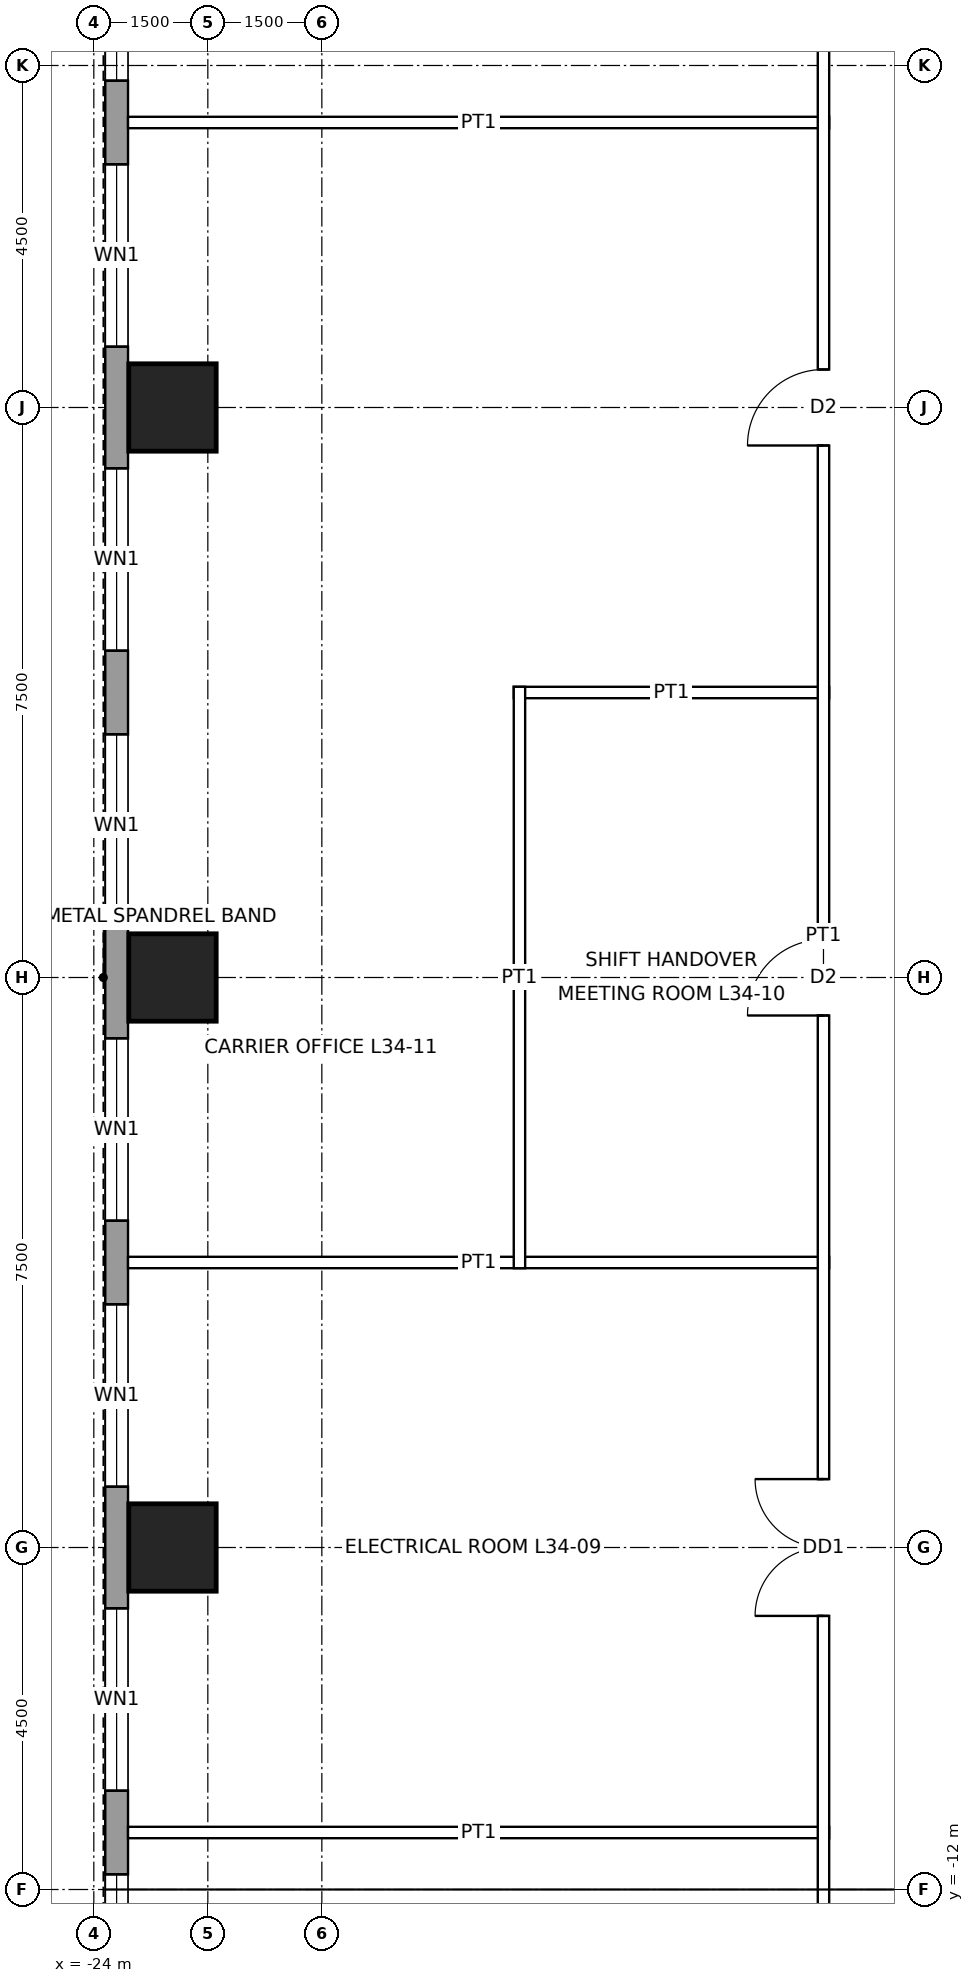
"""IFC4 building model, lengths in metres.
Left out: names, types, materials, properties, quantities, classifications, styles, units other than length and angle.
Written with IfcOpenShell. Run it as: python <this file> out.ifc"""

import sys

from ifc_helpers import new_model, si_unit, direction, frame, frame_2d, origin, origin_2d, place, context, subcontext, project, spatial, rectangle, hollow_rectangle, extrude, element, fill, save


model = new_model("IFC4")
c1 = context("Model", 3, precision=1e-05, world=origin(), true_north=direction((0.0, 1.0)))
c2 = subcontext(c1, "Body", "Model", "MODEL_VIEW")
j1 = project(units=[si_unit("LENGTHUNIT", "METRE"), si_unit("PLANEANGLEUNIT", "RADIAN")], contexts=[c1])
p1 = place(None, origin())
s1 = spatial("IfcSite", under=j1, at=p1, CompositionType="ELEMENT")
p2 = place(p1, origin())
s2 = spatial("IfcBuilding", under=s1, at=p2, CompositionType="ELEMENT")
p3 = place(p2, frame((0.0, 0.0, 167.4)))
s3 = spatial("IfcBuildingStorey", under=s2, at=p3, CompositionType="ELEMENT", Elevation=167.4)
for number, where, z_axis, x_axis in (
    (1, (-22.965, -7.5, 0.0), (0.0, 0.0, 1.0), (1.0, 0.0, 0.0)),
    (2, (-22.965, 0.0, 0.0), (0.0, 0.0, 1.0), (1.0, 0.0, 0.0)),
    (3, (-22.965, 7.5, 0.0), (0.0, 0.0, 1.0), (1.0, 0.0, 0.0)),
):
    element("IfcColumn", number, at=place(p3, frame(where, z_axis=z_axis, x_axis=x_axis)), inside=s3, PredefinedType="COLUMN", context=c2, shape_type="SweptSolid", body=[
        extrude(hollow_rectangle(XDim=1.15, YDim=1.15, WallThickness=0.075, at=origin_2d()), origin(), (0.0, 0.0, 1.0), 4.5),
    ])
p4 = place(p3, frame((-23.7, -16.2, 0.0), z_axis=(0.0, 0.0, 1.0), x_axis=(0.0, 1.0, 0.0)))
e4 = element("IfcWall", 4, at=p4, inside=s3, PredefinedType="SOLIDWALL", context=c2, shape_type="SweptSolid", body=[
    extrude(rectangle(XDim=32.4, YDim=0.3, at=frame_2d((16.2, 0.0))), origin(), (0.0, 0.0, 1.0), 4.25),
])
p5 = place(p4, frame((2.0, 0.0, 1.0)))
e5 = element("IfcOpeningElement", 5, at=p5, cuts=e4, PredefinedType="OPENING", context=c2, shape_type="SweptSolid", body=[
    extrude(rectangle(XDim=2.4, YDim=1.2, at=frame_2d((1.2, 0.6))), frame((0.0, 0.16, 0.0), z_axis=(0.0, -1.0, 0.0), x_axis=(1.0, 0.0, 0.0)), (0.0, 0.0, 1.0), 0.32),
])
p6 = place(p4, frame((5.5, 0.0, 1.0)))
e6 = element("IfcOpeningElement", 6, at=p6, cuts=e4, PredefinedType="OPENING", context=c2, shape_type="SweptSolid", body=[
    extrude(rectangle(XDim=2.4, YDim=1.2, at=frame_2d((1.2, 0.6))), frame((0.0, 0.16, 0.0), z_axis=(0.0, -1.0, 0.0), x_axis=(1.0, 0.0, 0.0)), (0.0, 0.0, 1.0), 0.32),
])
p7 = place(p4, frame((9.5, 0.0, 1.0)))
e7 = element("IfcOpeningElement", 7, at=p7, cuts=e4, PredefinedType="OPENING", context=c2, shape_type="SweptSolid", body=[
    extrude(rectangle(XDim=2.4, YDim=1.2, at=frame_2d((1.2, 0.6))), frame((0.0, 0.16, 0.0), z_axis=(0.0, -1.0, 0.0), x_axis=(1.0, 0.0, 0.0)), (0.0, 0.0, 1.0), 0.32),
])
p8 = place(p4, frame((13.0, 0.0, 1.0)))
e8 = element("IfcOpeningElement", 8, at=p8, cuts=e4, PredefinedType="OPENING", context=c2, shape_type="SweptSolid", body=[
    extrude(rectangle(XDim=2.4, YDim=1.2, at=frame_2d((1.2, 0.6))), frame((0.0, 0.16, 0.0), z_axis=(0.0, -1.0, 0.0), x_axis=(1.0, 0.0, 0.0)), (0.0, 0.0, 1.0), 0.32),
])
p9 = place(p4, frame((17.0, 0.0, 1.0)))
e9 = element("IfcOpeningElement", 9, at=p9, cuts=e4, PredefinedType="OPENING", context=c2, shape_type="SweptSolid", body=[
    extrude(rectangle(XDim=2.4, YDim=1.2, at=frame_2d((1.2, 0.6))), frame((0.0, 0.16, 0.0), z_axis=(0.0, -1.0, 0.0), x_axis=(1.0, 0.0, 0.0)), (0.0, 0.0, 1.0), 0.32),
])
p10 = place(p4, frame((20.5, 0.0, 1.0)))
e10 = element("IfcOpeningElement", 10, at=p10, cuts=e4, PredefinedType="OPENING", context=c2, shape_type="SweptSolid", body=[
    extrude(rectangle(XDim=2.4, YDim=1.2, at=frame_2d((1.2, 0.6))), frame((0.0, 0.16, 0.0), z_axis=(0.0, -1.0, 0.0), x_axis=(1.0, 0.0, 0.0)), (0.0, 0.0, 1.0), 0.32),
])
p11 = place(p4, frame((24.5, 0.0, 1.0)))
e11 = element("IfcOpeningElement", 11, at=p11, cuts=e4, PredefinedType="OPENING", context=c2, shape_type="SweptSolid", body=[
    extrude(rectangle(XDim=2.4, YDim=1.2, at=frame_2d((1.2, 0.6))), frame((0.0, 0.16, 0.0), z_axis=(0.0, -1.0, 0.0), x_axis=(1.0, 0.0, 0.0)), (0.0, 0.0, 1.0), 0.32),
])
p12 = place(p4, frame((28.0, 0.0, 1.0)))
e12 = element("IfcOpeningElement", 12, at=p12, cuts=e4, PredefinedType="OPENING", context=c2, shape_type="SweptSolid", body=[
    extrude(rectangle(XDim=2.4, YDim=1.2, at=frame_2d((1.2, 0.6))), frame((0.0, 0.16, 0.0), z_axis=(0.0, -1.0, 0.0), x_axis=(1.0, 0.0, 0.0)), (0.0, 0.0, 1.0), 0.32),
])
for number, where, z_axis, x_axis in (
    (13, (-23.55, -11.25, 0.0), (0.0, 0.0, 1.0), (1.0, 0.0, 0.0)),
    (14, (-23.55, -3.75, 0.0), (0.0, 0.0, 1.0), (1.0, 0.0, 0.0)),
):
    element("IfcWall", number, at=place(p3, frame(where, z_axis=z_axis, x_axis=x_axis)), inside=s3, PredefinedType="PARTITIONING", context=c2, shape_type="SweptSolid", body=[
        extrude(rectangle(XDim=9.225, YDim=0.15, at=frame_2d((4.613, 0.0))), origin(), (0.0, 0.0, 1.0), 3.409),
    ])
p13 = place(p3, frame((-18.475, 3.75, 0.0), z_axis=(0.0, 0.0, 1.0), x_axis=(1.0, 0.0, 0.0)))
e15 = element("IfcWall", 15, at=p13, inside=s3, PredefinedType="PARTITIONING", context=c2, shape_type="SweptSolid", body=[
    extrude(rectangle(XDim=4.15, YDim=0.15, at=frame_2d((2.075, 0.0))), origin(), (0.0, 0.0, 1.0), 3.409),
])
p14 = place(p3, frame((-23.55, 11.25, 0.0), z_axis=(0.0, 0.0, 1.0), x_axis=(1.0, 0.0, 0.0)))
e16 = element("IfcWall", 16, at=p14, inside=s3, PredefinedType="PARTITIONING", context=c2, shape_type="SweptSolid", body=[
    extrude(rectangle(XDim=9.225, YDim=0.15, at=frame_2d((4.613, 0.0))), origin(), (0.0, 0.0, 1.0), 3.409),
])
p15 = place(p3, frame((-18.4, -3.825, 0.0), z_axis=(0.0, 0.0, 1.0), x_axis=(0.0, 1.0, 0.0)))
e17 = element("IfcWall", 17, at=p15, inside=s3, PredefinedType="PARTITIONING", context=c2, shape_type="SweptSolid", body=[
    extrude(rectangle(XDim=7.65, YDim=0.15, at=frame_2d((3.825, 0.0))), origin(), (0.0, 0.0, 1.0), 4.25),
])
p16 = place(p3, frame((-14.4, -14.475, 0.0), z_axis=(0.0, 0.0, 1.0), x_axis=(0.0, 1.0, 0.0)))
e18 = element("IfcWall", 18, at=p16, inside=s3, PredefinedType="PARTITIONING", context=c2, shape_type="SweptSolid", body=[
    extrude(rectangle(XDim=28.95, YDim=0.15, at=frame_2d((14.475, 0.0))), origin(), (0.0, 0.0, 1.0), 4.25),
])
p17 = place(p16, frame((6.075, 0.0, 0.0)))
e19 = element("IfcOpeningElement", 19, at=p17, cuts=e18, PredefinedType="OPENING", context=c2, shape_type="SweptSolid", body=[
    extrude(rectangle(XDim=1.8, YDim=2.4, at=frame_2d((0.9, 1.2))), frame((0.0, 0.085, 0.0), z_axis=(0.0, -1.0, 0.0), x_axis=(1.0, 0.0, 0.0)), (0.0, 0.0, 1.0), 0.17),
])
p18 = place(p16, frame((13.975, 0.0, 0.0)))
e20 = element("IfcOpeningElement", 20, at=p18, cuts=e18, PredefinedType="OPENING", context=c2, shape_type="SweptSolid", body=[
    extrude(rectangle(XDim=1.0, YDim=2.1, at=frame_2d((0.5, 1.05))), frame((0.0, 0.085, 0.0), z_axis=(0.0, -1.0, 0.0), x_axis=(1.0, 0.0, 0.0)), (0.0, 0.0, 1.0), 0.17),
])
p19 = place(p16, frame((21.475, 0.0, 0.0)))
e21 = element("IfcOpeningElement", 21, at=p19, cuts=e18, PredefinedType="OPENING", context=c2, shape_type="SweptSolid", body=[
    extrude(rectangle(XDim=1.0, YDim=2.1, at=frame_2d((0.5, 1.05))), frame((0.0, 0.085, 0.0), z_axis=(0.0, -1.0, 0.0), x_axis=(1.0, 0.0, 0.0)), (0.0, 0.0, 1.0), 0.17),
])
p20 = place(p5, origin())
e22 = element("IfcWindow", 22, at=p20, inside=s3, PartitioningType="SINGLE_PANEL", PredefinedType="WINDOW", context=c2, shape_type="SweptSolid", body=[
    extrude(rectangle(XDim=2.4, YDim=1.2, at=frame_2d((1.2, 0.6))), frame((0.0, 0.03, 0.0), z_axis=(0.0, -1.0, 0.0), x_axis=(1.0, 0.0, 0.0)), (0.0, 0.0, 1.0), 0.06),
])
fill(e5, e22)
p21 = place(p6, origin())
e23 = element("IfcWindow", 23, at=p21, inside=s3, PartitioningType="SINGLE_PANEL", PredefinedType="WINDOW", context=c2, shape_type="SweptSolid", body=[
    extrude(rectangle(XDim=2.4, YDim=1.2, at=frame_2d((1.2, 0.6))), frame((0.0, 0.03, 0.0), z_axis=(0.0, -1.0, 0.0), x_axis=(1.0, 0.0, 0.0)), (0.0, 0.0, 1.0), 0.06),
])
fill(e6, e23)
p22 = place(p7, origin())
e24 = element("IfcWindow", 24, at=p22, inside=s3, PartitioningType="SINGLE_PANEL", PredefinedType="WINDOW", context=c2, shape_type="SweptSolid", body=[
    extrude(rectangle(XDim=2.4, YDim=1.2, at=frame_2d((1.2, 0.6))), frame((0.0, 0.03, 0.0), z_axis=(0.0, -1.0, 0.0), x_axis=(1.0, 0.0, 0.0)), (0.0, 0.0, 1.0), 0.06),
])
fill(e7, e24)
p23 = place(p8, origin())
e25 = element("IfcWindow", 25, at=p23, inside=s3, PartitioningType="SINGLE_PANEL", PredefinedType="WINDOW", context=c2, shape_type="SweptSolid", body=[
    extrude(rectangle(XDim=2.4, YDim=1.2, at=frame_2d((1.2, 0.6))), frame((0.0, 0.03, 0.0), z_axis=(0.0, -1.0, 0.0), x_axis=(1.0, 0.0, 0.0)), (0.0, 0.0, 1.0), 0.06),
])
fill(e8, e25)
p24 = place(p9, origin())
e26 = element("IfcWindow", 26, at=p24, inside=s3, PartitioningType="SINGLE_PANEL", PredefinedType="WINDOW", context=c2, shape_type="SweptSolid", body=[
    extrude(rectangle(XDim=2.4, YDim=1.2, at=frame_2d((1.2, 0.6))), frame((0.0, 0.03, 0.0), z_axis=(0.0, -1.0, 0.0), x_axis=(1.0, 0.0, 0.0)), (0.0, 0.0, 1.0), 0.06),
])
fill(e9, e26)
p25 = place(p10, origin())
e27 = element("IfcWindow", 27, at=p25, inside=s3, PartitioningType="SINGLE_PANEL", PredefinedType="WINDOW", context=c2, shape_type="SweptSolid", body=[
    extrude(rectangle(XDim=2.4, YDim=1.2, at=frame_2d((1.2, 0.6))), frame((0.0, 0.03, 0.0), z_axis=(0.0, -1.0, 0.0), x_axis=(1.0, 0.0, 0.0)), (0.0, 0.0, 1.0), 0.06),
])
fill(e10, e27)
p26 = place(p11, origin())
e28 = element("IfcWindow", 28, at=p26, inside=s3, PartitioningType="SINGLE_PANEL", PredefinedType="WINDOW", context=c2, shape_type="SweptSolid", body=[
    extrude(rectangle(XDim=2.4, YDim=1.2, at=frame_2d((1.2, 0.6))), frame((0.0, 0.03, 0.0), z_axis=(0.0, -1.0, 0.0), x_axis=(1.0, 0.0, 0.0)), (0.0, 0.0, 1.0), 0.06),
])
fill(e11, e28)
p27 = place(p12, origin())
e29 = element("IfcWindow", 29, at=p27, inside=s3, PartitioningType="SINGLE_PANEL", PredefinedType="WINDOW", context=c2, shape_type="SweptSolid", body=[
    extrude(rectangle(XDim=2.4, YDim=1.2, at=frame_2d((1.2, 0.6))), frame((0.0, 0.03, 0.0), z_axis=(0.0, -1.0, 0.0), x_axis=(1.0, 0.0, 0.0)), (0.0, 0.0, 1.0), 0.06),
])
fill(e12, e29)
p28 = place(p17, origin())
e30 = element("IfcDoor", 30, at=p28, inside=s3, OperationType="DOUBLE_DOOR_SINGLE_SWING", PredefinedType="DOOR", context=c2, shape_type="SweptSolid", body=[
    extrude(rectangle(XDim=1.8, YDim=2.4, at=frame_2d((0.9, 1.2))), frame((0.0, 0.025, 0.0), z_axis=(0.0, -1.0, 0.0), x_axis=(1.0, 0.0, 0.0)), (0.0, 0.0, 1.0), 0.05),
])
fill(e19, e30)
p29 = place(p18, origin())
e31 = element("IfcDoor", 31, at=p29, inside=s3, OperationType="SINGLE_SWING_LEFT", PredefinedType="DOOR", context=c2, shape_type="SweptSolid", body=[
    extrude(rectangle(XDim=1.0, YDim=2.1, at=frame_2d((0.5, 1.05))), frame((0.0, 0.025, 0.0), z_axis=(0.0, -1.0, 0.0), x_axis=(1.0, 0.0, 0.0)), (0.0, 0.0, 1.0), 0.05),
])
fill(e20, e31)
p30 = place(p19, origin())
e32 = element("IfcDoor", 32, at=p30, inside=s3, OperationType="SINGLE_SWING_LEFT", PredefinedType="DOOR", context=c2, shape_type="SweptSolid", body=[
    extrude(rectangle(XDim=1.0, YDim=2.1, at=frame_2d((0.5, 1.05))), frame((0.0, 0.025, 0.0), z_axis=(0.0, -1.0, 0.0), x_axis=(1.0, 0.0, 0.0)), (0.0, 0.0, 1.0), 0.05),
])
fill(e21, e32)
save(model, sys.argv[1])
